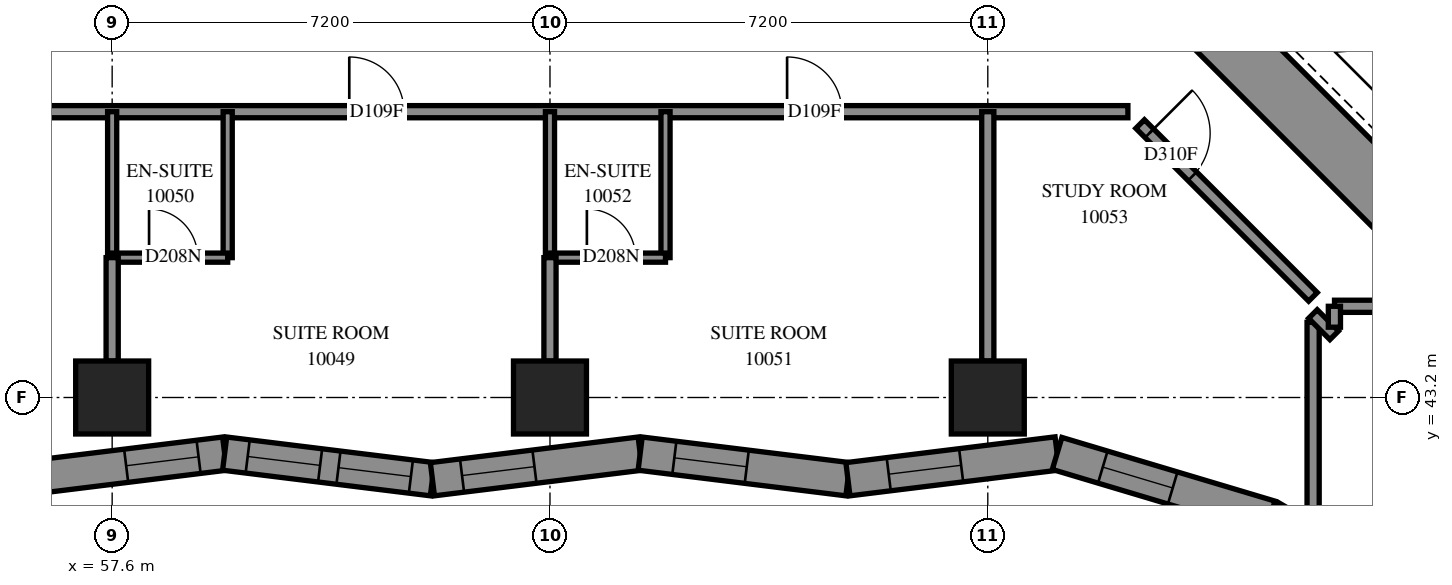
"""IFC4 building model, lengths in metres.
Left out: names, types, materials, properties, quantities, classifications, styles, units other than length and angle.
Written with IfcOpenShell. Run it as: python <this file> out.ifc"""

import sys

from ifc_helpers import new_model, si_unit, direction, frame, frame_2d, origin, origin_2d, place, context, subcontext, project, spatial, polyline, rectangle, outline, extrude, element, fill, save


model = new_model("IFC4")
c1 = context("Model", 3, precision=1e-05, world=origin(), true_north=direction((0.0, 1.0)))
c2 = subcontext(c1, "Body", "Model", "MODEL_VIEW")
j1 = project(units=[si_unit("LENGTHUNIT", "METRE"), si_unit("PLANEANGLEUNIT", "RADIAN")], contexts=[c1])
p1 = place(None, origin())
s1 = spatial("IfcSite", under=j1, at=p1, CompositionType="ELEMENT")
p2 = place(p1, origin())
s2 = spatial("IfcBuilding", under=s1, at=p2, CompositionType="ELEMENT")
p3 = place(p2, frame((0.0, 0.0, 40.6)))
s3 = spatial("IfcBuildingStorey", under=s2, at=p3, CompositionType="ELEMENT", Elevation=40.6)
for number, where, z_axis, x_axis in (
    (1, (57.6, 43.2, 0.0), (0.0, 0.0, 1.0), (1.0, 0.0, 0.0)),
    (2, (64.8, 43.2, 0.0), (0.0, 0.0, 1.0), (1.0, 0.0, 0.0)),
    (3, (72.0, 43.2, 0.0), (0.0, 0.0, 1.0), (1.0, 0.0, 0.0)),
):
    element("IfcColumn", number, at=place(p3, frame(where, z_axis=z_axis, x_axis=x_axis)), inside=s3, PredefinedType="COLUMN", context=c2, shape_type="SweptSolid", body=[
        extrude(rectangle(XDim=1.2, YDim=1.2, at=origin_2d()), origin(), (0.0, 0.0, 1.0), 3.1),
    ])
p4 = place(p3, frame((75.594, 49.443, -0.3), z_axis=(0.0, 0.0, 1.0), x_axis=(0.7071037324, -0.70710983, 0.0)))
e4 = element("IfcWall", 4, at=p4, inside=s3, PredefinedType="SHEAR", context=c2, shape_type="SweptSolid", body=[
    extrude(rectangle(XDim=16.4, YDim=1.0, at=frame_2d((8.2, 0.0))), origin(), (0.0, 0.0, 1.0), 2.7),
])
p5 = place(p3, frame((56.033, 41.856, 0.0), z_axis=(0.0, 0.0, 1.0), x_axis=(0.9924939881, 0.122293432, 0.0)))
e5 = element("IfcWall", 5, at=p5, inside=s3, PredefinedType="SOLIDWALL", context=c2, shape_type="SweptSolid", body=[
    extrude(outline(polyline([(-0.034, -0.275), (3.409, -0.275), (3.476, 0.275), (0.034, 0.275), (-0.034, -0.275)])), origin(), (0.0, 0.0, 1.0), 3.1),
])
p6 = place(p5, frame((1.81, 0.0, 0.5)))
e6 = element("IfcOpeningElement", 6, at=p6, cuts=e5, PredefinedType="OPENING", context=c2, shape_type="SweptSolid", body=[
    extrude(rectangle(XDim=1.2, YDim=2.45, at=frame_2d((0.6, 1.225))), frame((0.0, 0.285, 0.0), z_axis=(0.0, -1.0, 0.0), x_axis=(1.0, 0.0, 0.0)), (0.0, 0.0, 1.0), 0.57),
])
p7 = place(p3, frame((59.45, 42.277, 0.0), z_axis=(0.0, 0.0, 1.0), x_axis=(0.9924935537, -0.1222969578, 0.0)))
e7 = element("IfcWall", 7, at=p7, inside=s3, PredefinedType="SOLIDWALL", context=c2, shape_type="SweptSolid", body=[
    extrude(outline(polyline([(0.034, -0.275), (3.476, -0.275), (3.409, 0.275), (-0.034, 0.275), (0.034, -0.275)])), origin(), (0.0, 0.0, 1.0), 3.1),
])
p8 = place(p7, frame((0.382, 0.0, 0.5)))
e8 = element("IfcOpeningElement", 8, at=p8, cuts=e7, PredefinedType="OPENING", context=c2, shape_type="SweptSolid", body=[
    extrude(rectangle(XDim=1.2, YDim=2.45, at=frame_2d((0.6, 1.225))), frame((0.0, 0.285, 0.0), z_axis=(0.0, -1.0, 0.0), x_axis=(1.0, 0.0, 0.0)), (0.0, 0.0, 1.0), 0.57),
])
p9 = place(p7, frame((1.886, 0.0, 0.5)))
e9 = element("IfcOpeningElement", 9, at=p9, cuts=e7, PredefinedType="OPENING", context=c2, shape_type="SweptSolid", body=[
    extrude(rectangle(XDim=1.2, YDim=2.45, at=frame_2d((0.6, 1.225))), frame((0.0, 0.285, 0.0), z_axis=(0.0, -1.0, 0.0), x_axis=(1.0, 0.0, 0.0)), (0.0, 0.0, 1.0), 0.57),
])
p10 = place(p3, frame((62.867, 41.856, 0.0), z_axis=(0.0, 0.0, 1.0), x_axis=(0.9924935537, 0.1222969578, 0.0)))
e10 = element("IfcWall", 10, at=p10, inside=s3, PredefinedType="SOLIDWALL", context=c2, shape_type="SweptSolid", body=[
    extrude(outline(polyline([(-0.034, -0.275), (3.409, -0.275), (3.476, 0.275), (0.034, 0.275), (-0.034, -0.275)])), origin(), (0.0, 0.0, 1.0), 3.1),
])
p11 = place(p10, frame((0.491, 0.0, 0.5)))
e11 = element("IfcOpeningElement", 11, at=p11, cuts=e10, PredefinedType="OPENING", context=c2, shape_type="SweptSolid", body=[
    extrude(rectangle(XDim=1.2, YDim=2.45, at=frame_2d((0.6, 1.225))), frame((0.0, 0.285, 0.0), z_axis=(0.0, -1.0, 0.0), x_axis=(1.0, 0.0, 0.0)), (0.0, 0.0, 1.0), 0.57),
])
p12 = place(p3, frame((66.283, 42.277, 0.0), z_axis=(0.0, 0.0, 1.0), x_axis=(0.9924935537, -0.1222969578, 0.0)))
e12 = element("IfcWall", 12, at=p12, inside=s3, PredefinedType="SOLIDWALL", context=c2, shape_type="SweptSolid", body=[
    extrude(outline(polyline([(0.034, -0.275), (3.476, -0.275), (3.409, 0.275), (-0.034, 0.275), (0.034, -0.275)])), origin(), (0.0, 0.0, 1.0), 3.1),
])
p13 = place(p12, frame((0.566, 0.0, 0.5)))
e13 = element("IfcOpeningElement", 13, at=p13, cuts=e12, PredefinedType="OPENING", context=c2, shape_type="SweptSolid", body=[
    extrude(rectangle(XDim=1.2, YDim=2.45, at=frame_2d((0.6, 1.225))), frame((0.0, 0.285, 0.0), z_axis=(0.0, -1.0, 0.0), x_axis=(1.0, 0.0, 0.0)), (0.0, 0.0, 1.0), 0.57),
])
p14 = place(p3, frame((69.7, 41.856, 0.0), z_axis=(0.0, 0.0, 1.0), x_axis=(0.9924938351, 0.1222946738, 0.0)))
e14 = element("IfcWall", 14, at=p14, inside=s3, PredefinedType="SOLIDWALL", context=c2, shape_type="SweptSolid", body=[
    extrude(outline(polyline([(-0.034, -0.275), (3.409, -0.275), (3.524, 0.275), (0.034, 0.275), (-0.034, -0.275)])), origin(), (0.0, 0.0, 1.0), 3.1),
])
p15 = place(p14, frame((0.676, 0.0, 0.5)))
e15 = element("IfcOpeningElement", 15, at=p15, cuts=e14, PredefinedType="OPENING", context=c2, shape_type="SweptSolid", body=[
    extrude(rectangle(XDim=1.2, YDim=2.45, at=frame_2d((0.6, 1.225))), frame((0.0, 0.285, 0.0), z_axis=(0.0, -1.0, 0.0), x_axis=(1.0, 0.0, 0.0)), (0.0, 0.0, 1.0), 0.57),
])
p16 = place(p3, frame((73.14, 42.28, 0.0), z_axis=(0.0, 0.0, 1.0), x_axis=(0.9581313629, -0.2863289917, 0.0)))
e16 = element("IfcWall", 16, at=p16, inside=s3, PredefinedType="SOLIDWALL", context=c2, shape_type="SweptSolid", body=[
    extrude(outline(polyline([(0.058, -0.275), (3.623, -0.275), (3.689, 0.275), (-0.058, 0.275), (0.058, -0.275)])), origin(), (0.0, 0.0, 1.0), 3.1),
])
p17 = place(p16, frame((0.784, 0.0, 0.5)))
e17 = element("IfcOpeningElement", 17, at=p17, cuts=e16, PredefinedType="OPENING", context=c2, shape_type="SweptSolid", body=[
    extrude(rectangle(XDim=1.2, YDim=2.45, at=frame_2d((0.6, 1.225))), frame((0.0, 0.285, 0.0), z_axis=(0.0, -1.0, 0.0), x_axis=(1.0, 0.0, 0.0)), (0.0, 0.0, 1.0), 0.57),
])
p18 = place(p3, frame((76.643, 41.233, 0.0), z_axis=(0.0, 0.0, 1.0), x_axis=(0.8639313483, -0.5036095962, 0.0)))
e18 = element("IfcWall", 18, at=p18, inside=s3, PredefinedType="SOLIDWALL", context=c2, shape_type="SweptSolid", body=[
    extrude(outline(polyline([(0.033, -0.275), (4.04, -0.275), (4.142, 0.275), (-0.033, 0.275), (0.033, -0.275)])), origin(), (0.0, 0.0, 1.0), 3.1),
])
p19 = place(p18, frame((2.2, 0.0, 0.5)))
e19 = element("IfcOpeningElement", 19, at=p19, cuts=e18, PredefinedType="OPENING", context=c2, shape_type="SweptSolid", body=[
    extrude(rectangle(XDim=1.2, YDim=2.45, at=frame_2d((0.6, 1.225))), frame((0.0, 0.285, 0.0), z_axis=(0.0, -1.0, 0.0), x_axis=(1.0, 0.0, 0.0)), (0.0, 0.0, 1.0), 0.57),
])
p20 = place(p18, frame((0.854, 0.0, 0.45)))
e20 = element("IfcOpeningElement", 20, at=p20, cuts=e18, PredefinedType="OPENING", context=c2, shape_type="SweptSolid", body=[
    extrude(rectangle(XDim=0.8, YDim=2.5, at=frame_2d((0.4, 1.25))), frame((0.0, 0.285, 0.0), z_axis=(0.0, -1.0, 0.0), x_axis=(1.0, 0.0, 0.0)), (0.0, 0.0, 1.0), 0.57),
])
p21 = place(p3, frame((55.1, 47.9, 0.0), z_axis=(0.0, 0.0, 1.0), x_axis=(1.0, 0.0, 0.0)))
e21 = element("IfcWall", 21, at=p21, inside=s3, PredefinedType="PARTITIONING", context=c2, shape_type="SweptSolid", body=[
    extrude(rectangle(XDim=19.204, YDim=0.2, at=frame_2d((9.602, 0.0))), origin(), (0.0, 0.0, 1.0), 3.1),
])
p22 = place(p21, frame((6.399, 0.0, 0.0)))
e22 = element("IfcOpeningElement", 22, at=p22, cuts=e21, PredefinedType="OPENING", context=c2, shape_type="SweptSolid", body=[
    extrude(rectangle(XDim=0.9, YDim=2.1, at=frame_2d((0.45, 1.05))), frame((0.0, 0.11, 0.0), z_axis=(0.0, -1.0, 0.0), x_axis=(1.0, 0.0, 0.0)), (0.0, 0.0, 1.0), 0.22),
])
p23 = place(p21, frame((13.599, 0.0, 0.0)))
e23 = element("IfcOpeningElement", 23, at=p23, cuts=e21, PredefinedType="OPENING", context=c2, shape_type="SweptSolid", body=[
    extrude(rectangle(XDim=0.9, YDim=2.1, at=frame_2d((0.45, 1.05))), frame((0.0, 0.11, 0.0), z_axis=(0.0, -1.0, 0.0), x_axis=(1.0, 0.0, 0.0)), (0.0, 0.0, 1.0), 0.22),
])
p24 = place(p3, frame((72.0, 43.8, 0.0), z_axis=(0.0, 0.0, 1.0), x_axis=(0.0, 1.0, 0.0)))
e24 = element("IfcWall", 24, at=p24, inside=s3, PredefinedType="PARTITIONING", context=c2, shape_type="SweptSolid", body=[
    extrude(rectangle(XDim=4.1, YDim=0.2, at=frame_2d((2.05, 0.0))), origin(), (0.0, 0.0, 1.0), 3.1),
])
p25 = place(p3, frame((74.505, 47.697, 0.0), z_axis=(0.0, 0.0, 1.0), x_axis=(0.7071067812, -0.7071067812, 0.0)))
e25 = element("IfcWall", 25, at=p25, inside=s3, PredefinedType="PARTITIONING", context=c2, shape_type="SweptSolid", body=[
    extrude(rectangle(XDim=4.019, YDim=0.2, at=frame_2d((2.01, 0.0))), origin(), (0.0, 0.0, 1.0), 3.1),
])
p26 = place(p25, frame((0.215, 0.0, 0.0)))
e26 = element("IfcOpeningElement", 26, at=p26, cuts=e25, PredefinedType="OPENING", context=c2, shape_type="SweptSolid", body=[
    extrude(rectangle(XDim=1.0, YDim=2.1, at=frame_2d((0.5, 1.05))), frame((0.0, 0.11, 0.0), z_axis=(0.0, -1.0, 0.0), x_axis=(1.0, 0.0, 0.0)), (0.0, 0.0, 1.0), 0.22),
])
p27 = place(p3, frame((77.35, 41.139, 0.0), z_axis=(0.0, 0.0, 1.0), x_axis=(0.0, 1.0, 0.0)))
e27 = element("IfcWall", 27, at=p27, inside=s3, PredefinedType="PARTITIONING", context=c2, shape_type="SweptSolid", body=[
    extrude(rectangle(XDim=3.297, YDim=0.2, at=frame_2d((1.648, 0.0))), origin(), (0.0, 0.0, 1.0), 3.1),
])
for number, where, z_axis, x_axis in (
    (28, (59.5, 45.5, 0.0), (0.0, 0.0, 1.0), (0.0, 1.0, 0.0)),
    (29, (57.6, 45.5, 0.0), (0.0, 0.0, 1.0), (0.0, 1.0, 0.0)),
    (30, (66.7, 45.5, 0.0), (0.0, 0.0, 1.0), (0.0, 1.0, 0.0)),
    (31, (64.8, 45.5, 0.0), (0.0, 0.0, 1.0), (0.0, 1.0, 0.0)),
):
    element("IfcWall", number, at=place(p3, frame(where, z_axis=z_axis, x_axis=x_axis)), inside=s3, PredefinedType="PARTITIONING", context=c2, shape_type="SweptSolid", body=[
        extrude(rectangle(XDim=2.4, YDim=0.15, at=frame_2d((1.2, 0.0))), origin(), (0.0, 0.0, 1.0), 3.1),
    ])
p28 = place(p3, frame((64.8, 45.5, 0.0), z_axis=(0.0, 0.0, 1.0), x_axis=(1.0, 0.0, 0.0)))
e32 = element("IfcWall", 32, at=p28, inside=s3, PredefinedType="PARTITIONING", context=c2, shape_type="SweptSolid", body=[
    extrude(rectangle(XDim=1.9, YDim=0.15, at=frame_2d((0.95, 0.0))), origin(), (0.0, 0.0, 1.0), 3.1),
])
p29 = place(p28, frame((0.607, 0.0, 0.0)))
e33 = element("IfcOpeningElement", 33, at=p29, cuts=e32, PredefinedType="OPENING", context=c2, shape_type="SweptSolid", body=[
    extrude(rectangle(XDim=0.8, YDim=2.1, at=frame_2d((0.4, 1.05))), frame((0.0, 0.085, 0.0), z_axis=(0.0, -1.0, 0.0), x_axis=(1.0, 0.0, 0.0)), (0.0, 0.0, 1.0), 0.17),
])
p30 = place(p3, frame((57.6, 45.5, 0.0), z_axis=(0.0, 0.0, 1.0), x_axis=(1.0, 0.0, 0.0)))
e34 = element("IfcWall", 34, at=p30, inside=s3, PredefinedType="PARTITIONING", context=c2, shape_type="SweptSolid", body=[
    extrude(rectangle(XDim=1.9, YDim=0.15, at=frame_2d((0.95, 0.0))), origin(), (0.0, 0.0, 1.0), 3.1),
])
p31 = place(p30, frame((0.607, 0.0, 0.0)))
e35 = element("IfcOpeningElement", 35, at=p31, cuts=e34, PredefinedType="OPENING", context=c2, shape_type="SweptSolid", body=[
    extrude(rectangle(XDim=0.8, YDim=2.1, at=frame_2d((0.4, 1.05))), frame((0.0, 0.085, 0.0), z_axis=(0.0, -1.0, 0.0), x_axis=(1.0, 0.0, 0.0)), (0.0, 0.0, 1.0), 0.17),
])
p32 = place(p3, frame((77.702, 44.7, 0.0), z_axis=(0.0, 0.0, 1.0), x_axis=(1.0, 0.0, 0.0)))
e36 = element("IfcWall", 36, at=p32, inside=s3, PredefinedType="PARTITIONING", context=c2, shape_type="SweptSolid", body=[
    extrude(rectangle(XDim=1.814, YDim=0.2, at=frame_2d((0.907, 0.0))), origin(), (0.0, 0.0, 1.0), 3.1),
])
for number, where, z_axis, x_axis in (
    (37, (57.6, 43.8, 0.0), (0.0, 0.0, 1.0), (0.0, 1.0, 0.0)),
    (38, (64.8, 43.8, 0.0), (0.0, 0.0, 1.0), (0.0, 1.0, 0.0)),
):
    element("IfcWall", number, at=place(p3, frame(where, z_axis=z_axis, x_axis=x_axis)), inside=s3, PredefinedType="PARTITIONING", context=c2, shape_type="SweptSolid", body=[
        extrude(rectangle(XDim=1.7, YDim=0.2, at=frame_2d((0.85, 0.0))), origin(), (0.0, 0.0, 1.0), 3.1),
    ])
p33 = place(p3, frame((77.347, 44.573, 0.0), z_axis=(0.0, 0.0, 1.0), x_axis=(0.7071067812, -0.7071067812, 0.0)))
e39 = element("IfcWall", 39, at=p33, inside=s3, PredefinedType="PARTITIONING", context=c2, shape_type="SweptSolid", body=[
    extrude(rectangle(XDim=0.495, YDim=0.2, at=frame_2d((0.247, 0.0))), origin(), (0.0, 0.0, 1.0), 3.1),
])
p34 = place(p3, frame((77.7, 44.356, 0.0), z_axis=(0.0, 0.0, 1.0), x_axis=(0.0, 1.0, 0.0)))
e40 = element("IfcWall", 40, at=p34, inside=s3, PredefinedType="PARTITIONING", context=c2, shape_type="SweptSolid", body=[
    extrude(rectangle(XDim=0.344, YDim=0.2, at=frame_2d((0.172, 0.0))), origin(), (0.0, 0.0, 1.0), 3.1),
])
p35 = place(p6, origin())
e41 = element("IfcWindow", 41, at=p35, inside=s3, PartitioningType="SINGLE_PANEL", PredefinedType="WINDOW", context=c2, shape_type="SweptSolid", body=[
    extrude(rectangle(XDim=1.2, YDim=2.45, at=frame_2d((0.6, 1.225))), frame((0.0, 0.155, 0.0), z_axis=(0.0, -1.0, 0.0), x_axis=(1.0, 0.0, 0.0)), (0.0, 0.0, 1.0), 0.06),
])
fill(e6, e41)
p36 = place(p8, origin())
e42 = element("IfcWindow", 42, at=p36, inside=s3, PartitioningType="SINGLE_PANEL", PredefinedType="WINDOW", context=c2, shape_type="SweptSolid", body=[
    extrude(rectangle(XDim=1.2, YDim=2.45, at=frame_2d((0.6, 1.225))), frame((0.0, 0.155, 0.0), z_axis=(0.0, -1.0, 0.0), x_axis=(1.0, 0.0, 0.0)), (0.0, 0.0, 1.0), 0.06),
])
fill(e8, e42)
p37 = place(p9, origin())
e43 = element("IfcWindow", 43, at=p37, inside=s3, PartitioningType="SINGLE_PANEL", PredefinedType="WINDOW", context=c2, shape_type="SweptSolid", body=[
    extrude(rectangle(XDim=1.2, YDim=2.45, at=frame_2d((0.6, 1.225))), frame((0.0, 0.155, 0.0), z_axis=(0.0, -1.0, 0.0), x_axis=(1.0, 0.0, 0.0)), (0.0, 0.0, 1.0), 0.06),
])
fill(e9, e43)
p38 = place(p11, origin())
e44 = element("IfcWindow", 44, at=p38, inside=s3, PartitioningType="SINGLE_PANEL", PredefinedType="WINDOW", context=c2, shape_type="SweptSolid", body=[
    extrude(rectangle(XDim=1.2, YDim=2.45, at=frame_2d((0.6, 1.225))), frame((0.0, 0.155, 0.0), z_axis=(0.0, -1.0, 0.0), x_axis=(1.0, 0.0, 0.0)), (0.0, 0.0, 1.0), 0.06),
])
fill(e11, e44)
p39 = place(p13, origin())
e45 = element("IfcWindow", 45, at=p39, inside=s3, PartitioningType="SINGLE_PANEL", PredefinedType="WINDOW", context=c2, shape_type="SweptSolid", body=[
    extrude(rectangle(XDim=1.2, YDim=2.45, at=frame_2d((0.6, 1.225))), frame((0.0, 0.155, 0.0), z_axis=(0.0, -1.0, 0.0), x_axis=(1.0, 0.0, 0.0)), (0.0, 0.0, 1.0), 0.06),
])
fill(e13, e45)
p40 = place(p15, origin())
e46 = element("IfcWindow", 46, at=p40, inside=s3, PartitioningType="SINGLE_PANEL", PredefinedType="WINDOW", context=c2, shape_type="SweptSolid", body=[
    extrude(rectangle(XDim=1.2, YDim=2.45, at=frame_2d((0.6, 1.225))), frame((0.0, 0.155, 0.0), z_axis=(0.0, -1.0, 0.0), x_axis=(1.0, 0.0, 0.0)), (0.0, 0.0, 1.0), 0.06),
])
fill(e15, e46)
p41 = place(p17, origin())
e47 = element("IfcWindow", 47, at=p41, inside=s3, PartitioningType="SINGLE_PANEL", PredefinedType="WINDOW", context=c2, shape_type="SweptSolid", body=[
    extrude(rectangle(XDim=1.2, YDim=2.45, at=frame_2d((0.6, 1.225))), frame((0.0, 0.155, 0.0), z_axis=(0.0, -1.0, 0.0), x_axis=(1.0, 0.0, 0.0)), (0.0, 0.0, 1.0), 0.06),
])
fill(e17, e47)
p42 = place(p22, origin())
e48 = element("IfcDoor", 48, at=p42, inside=s3, OperationType="SINGLE_SWING_LEFT", PredefinedType="DOOR", context=c2, shape_type="SweptSolid", body=[
    extrude(rectangle(XDim=0.9, YDim=2.1, at=frame_2d((0.45, 1.05))), frame((0.0, 0.025, 0.0), z_axis=(0.0, -1.0, 0.0), x_axis=(1.0, 0.0, 0.0)), (0.0, 0.0, 1.0), 0.05),
])
fill(e22, e48)
p43 = place(p31, origin())
e49 = element("IfcDoor", 49, at=p43, inside=s3, OperationType="SINGLE_SWING_RIGHT", PredefinedType="DOOR", context=c2, shape_type="SweptSolid", body=[
    extrude(rectangle(XDim=0.8, YDim=2.1, at=frame_2d((0.4, 1.05))), frame((0.0, 0.025, 0.0), z_axis=(0.0, -1.0, 0.0), x_axis=(1.0, 0.0, 0.0)), (0.0, 0.0, 1.0), 0.05),
])
fill(e35, e49)
p44 = place(p23, origin())
e50 = element("IfcDoor", 50, at=p44, inside=s3, OperationType="SINGLE_SWING_LEFT", PredefinedType="DOOR", context=c2, shape_type="SweptSolid", body=[
    extrude(rectangle(XDim=0.9, YDim=2.1, at=frame_2d((0.45, 1.05))), frame((0.0, 0.025, 0.0), z_axis=(0.0, -1.0, 0.0), x_axis=(1.0, 0.0, 0.0)), (0.0, 0.0, 1.0), 0.05),
])
fill(e23, e50)
p45 = place(p29, origin())
e51 = element("IfcDoor", 51, at=p45, inside=s3, OperationType="SINGLE_SWING_RIGHT", PredefinedType="DOOR", context=c2, shape_type="SweptSolid", body=[
    extrude(rectangle(XDim=0.8, YDim=2.1, at=frame_2d((0.4, 1.05))), frame((0.0, 0.025, 0.0), z_axis=(0.0, -1.0, 0.0), x_axis=(1.0, 0.0, 0.0)), (0.0, 0.0, 1.0), 0.05),
])
fill(e33, e51)
p46 = place(p26, origin())
e52 = element("IfcDoor", 52, at=p46, inside=s3, OperationType="SINGLE_SWING_LEFT", PredefinedType="DOOR", context=c2, shape_type="SweptSolid", body=[
    extrude(rectangle(XDim=1.0, YDim=2.1, at=frame_2d((0.5, 1.05))), frame((0.0, 0.025, 0.0), z_axis=(0.0, -1.0, 0.0), x_axis=(1.0, 0.0, 0.0)), (0.0, 0.0, 1.0), 0.05),
])
fill(e26, e52)
save(model, sys.argv[1])
